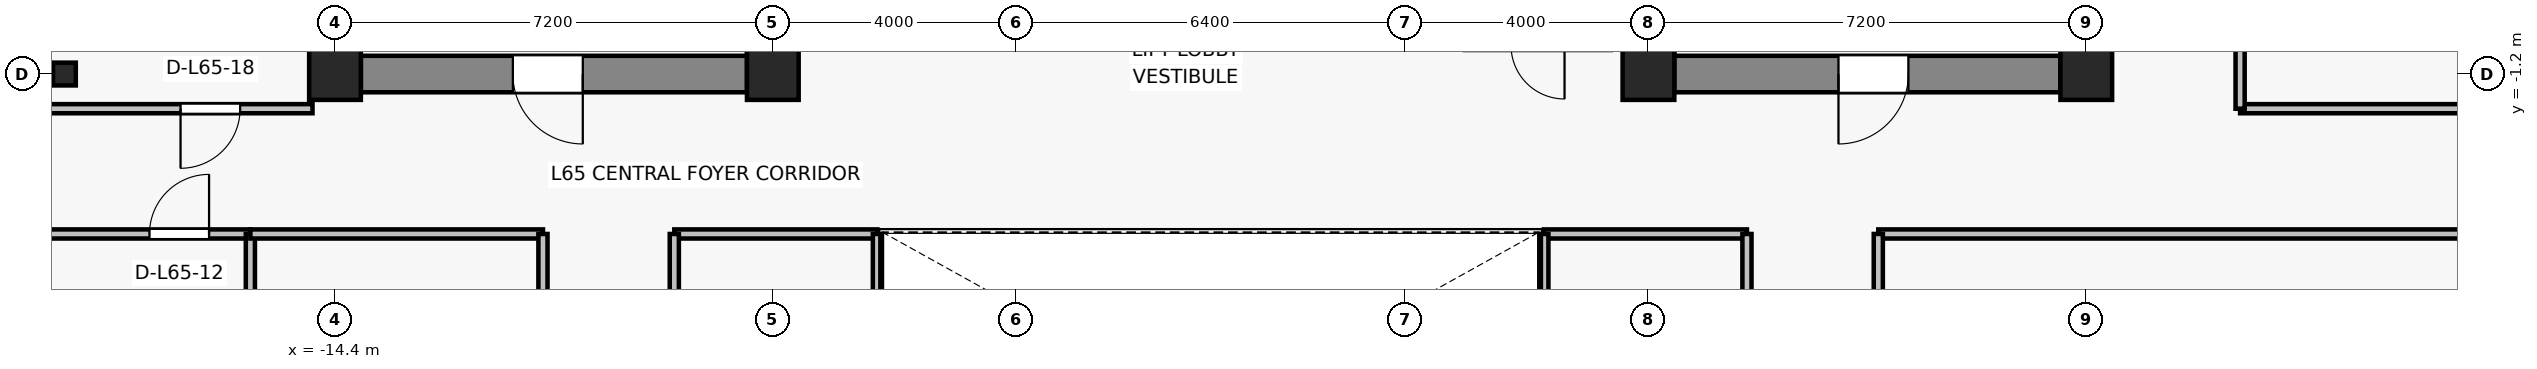
"""IFC4 building model, lengths in metres.
Left out: names, types, materials, properties, quantities, classifications, styles, units other than length and angle.
Written with IfcOpenShell. Run it as: python <this file> out.ifc"""

import sys

from ifc_helpers import new_model, si_unit, direction, frame, frame_2d, origin, origin_2d, place, context, subcontext, project, spatial, rectangle, i_section, extrude, source, transform, mapped, element, fill, save


model = new_model("IFC4")
c1 = context("Model", 3, precision=1e-05, world=origin(), true_north=direction((0.0, 1.0)))
c2 = subcontext(c1, "Body", "Model", "MODEL_VIEW")
j1 = project(units=[si_unit("LENGTHUNIT", "METRE"), si_unit("PLANEANGLEUNIT", "RADIAN")], contexts=[c1])
p1 = place(None, origin())
s1 = spatial("IfcSite", under=j1, at=p1, CompositionType="ELEMENT")
p2 = place(p1, origin())
s2 = spatial("IfcBuilding", under=s1, at=p2, CompositionType="ELEMENT")
p3 = place(p2, frame((0.0, 0.0, 232.0)))
s3 = spatial("IfcBuildingStorey", under=s2, at=p3, CompositionType="ELEMENT", Elevation=232.0)
for number, where, z_axis, x_axis in (
    (1, (-14.4, -1.2, 0.0), (0.0, 0.0, 1.0), (1.0, 0.0, 0.0)),
    (2, (-7.2, -1.2, 0.0), (0.0, 0.0, 1.0), (1.0, 0.0, 0.0)),
    (3, (7.2, -1.2, 0.0), (0.0, 0.0, 1.0), (1.0, 0.0, 0.0)),
    (4, (14.4, -1.2, 0.0), (0.0, 0.0, 1.0), (1.0, 0.0, 0.0)),
):
    element("IfcColumn", number, at=place(p3, frame(where, z_axis=z_axis, x_axis=x_axis)), inside=s3, PredefinedType="COLUMN", context=c2, shape_type="SweptSolid", body=[
        extrude(rectangle(XDim=0.85, YDim=0.85, at=origin_2d()), origin(), (0.0, 0.0, 1.0), 3.3),
    ])
p4 = place(p3, frame((-18.85, -1.2, 0.0), z_axis=(0.0, 0.0, 1.0), x_axis=(1.0, 0.0, 0.0)))
e5 = element("IfcColumn", 5, at=p4, inside=s3, PredefinedType="COLUMN", context=c2, shape_type="SweptSolid", body=[
    extrude(i_section(OverallWidth=0.375, OverallDepth=0.375, WebThickness=0.017, FlangeThickness=0.027, FilletRadius=0.015, at=origin_2d()), origin(), (0.0, 0.0, 1.0), 3.3),
])
p5 = place(p3, frame((-7.625, -1.2, 0.0), z_axis=(0.0, 0.0, 1.0), x_axis=(-1.0, 0.0, 0.0)))
e6 = element("IfcWall", 6, at=p5, inside=s3, PredefinedType="SHEAR", context=c2, shape_type="SweptSolid", body=[
    extrude(rectangle(XDim=6.35, YDim=0.6, at=frame_2d((3.175, 0.0))), origin(), (0.0, 0.0, 1.0), 3.075),
])
p6 = place(p5, frame((2.7, 0.0, 0.0)))
e7 = element("IfcOpeningElement", 7, at=p6, cuts=e6, PredefinedType="OPENING", context=c2, shape_type="SweptSolid", body=[
    extrude(rectangle(XDim=1.15, YDim=2.15, at=frame_2d((0.575, 1.075))), frame((0.0, 0.31, 0.0), z_axis=(0.0, -1.0, 0.0), x_axis=(1.0, 0.0, 0.0)), (0.0, 0.0, 1.0), 0.62),
])
p7 = place(p3, frame((13.975, -1.2, 0.0), z_axis=(0.0, 0.0, 1.0), x_axis=(-1.0, 0.0, 0.0)))
e8 = element("IfcWall", 8, at=p7, inside=s3, PredefinedType="SHEAR", context=c2, shape_type="SweptSolid", body=[
    extrude(rectangle(XDim=6.35, YDim=0.6, at=frame_2d((3.175, 0.0))), origin(), (0.0, 0.0, 1.0), 3.075),
])
p8 = place(p7, frame((2.5, 0.0, 0.0)))
e9 = element("IfcOpeningElement", 9, at=p8, cuts=e8, PredefinedType="OPENING", context=c2, shape_type="SweptSolid", body=[
    extrude(rectangle(XDim=1.15, YDim=2.15, at=frame_2d((0.575, 1.075))), frame((0.0, 0.31, 0.0), z_axis=(0.0, -1.0, 0.0), x_axis=(1.0, 0.0, 0.0)), (0.0, 0.0, 1.0), 0.62),
])
for number, where, z_axis, x_axis in (
    (10, (-7.4, -0.9, 0.0), (0.0, 0.0, 1.0), (0.0, 1.0, 0.0)),
    (11, (7.4, -0.9, 0.0), (0.0, 0.0, 1.0), (0.0, 1.0, 0.0)),
):
    element("IfcWall", number, at=place(p3, frame(where, z_axis=z_axis, x_axis=x_axis)), inside=s3, PredefinedType="SHEAR", context=c2, shape_type="SweptSolid", body=[
        extrude(rectangle(XDim=4.15, YDim=0.45, at=frame_2d((2.075, 0.0))), origin(), (0.0, 0.0, 1.0), 3.075),
    ])
p9 = place(p3, frame((-19.53, -3.83, 0.0), z_axis=(0.0, 0.0, 1.0), x_axis=(1.0, 0.0, 0.0)))
e12 = element("IfcWall", 12, at=p9, inside=s3, PredefinedType="PARTITIONING", context=c2, shape_type="SweptSolid", body=[
    extrude(rectangle(XDim=3.738, YDim=0.15, at=frame_2d((1.869, 0.0))), origin(), (0.0, 0.0, 1.0), 2.765),
])
p10 = place(p9, frame((2.079, 0.0, 0.0)))
e13 = element("IfcOpeningElement", 13, at=p10, cuts=e12, PredefinedType="OPENING", context=c2, shape_type="SweptSolid", body=[
    extrude(rectangle(XDim=0.98, YDim=2.15, at=frame_2d((0.49, 1.075))), frame((0.0, 0.085, 0.0), z_axis=(0.0, -1.0, 0.0), x_axis=(1.0, 0.0, 0.0)), (0.0, 0.0, 1.0), 0.17),
])
p11 = place(p3, frame((-15.792, -3.83, 0.0), z_axis=(0.0, 0.0, 1.0), x_axis=(0.0, -1.0, 0.0)))
e14 = element("IfcWall", 14, at=p11, inside=s3, PredefinedType="PARTITIONING", context=c2, shape_type="SweptSolid", body=[
    extrude(rectangle(XDim=13.2, YDim=0.15, at=frame_2d((6.6, 0.0))), origin(), (0.0, 0.0, 1.0), 2.615),
])
p12 = place(p3, frame((-15.792, -3.83, 0.0), z_axis=(0.0, 0.0, 1.0), x_axis=(1.0, 0.0, 0.0)))
e15 = element("IfcWall", 15, at=p12, inside=s3, PredefinedType="PARTITIONING", context=c2, shape_type="SweptSolid", body=[
    extrude(rectangle(XDim=4.812, YDim=0.15, at=frame_2d((2.406, 0.0))), origin(), (0.0, 0.0, 1.0), 2.615),
])
p13 = place(p3, frame((-10.98, -3.83, 0.0), z_axis=(0.0, 0.0, 1.0), x_axis=(0.0, -1.0, 0.0)))
e16 = element("IfcWall", 16, at=p13, inside=s3, PredefinedType="PARTITIONING", context=c2, shape_type="SweptSolid", body=[
    extrude(rectangle(XDim=13.2, YDim=0.15, at=frame_2d((6.6, 0.0))), origin(), (0.0, 0.0, 1.0), 2.615),
])
p14 = place(p13, frame((2.88, 0.0, 0.0)))
e17 = element("IfcOpeningElement", 17, at=p14, cuts=e16, PredefinedType="OPENING", context=c2, shape_type="SweptSolid", body=[
    extrude(rectangle(XDim=0.98, YDim=2.15, at=frame_2d((0.49, 1.075))), frame((0.0, 0.085, 0.0), z_axis=(0.0, -1.0, 0.0), x_axis=(1.0, 0.0, 0.0)), (0.0, 0.0, 1.0), 0.17),
])
p15 = place(p3, frame((10.98, -3.83, 0.0), z_axis=(0.0, 0.0, 1.0), x_axis=(1.0, 0.0, 0.0)))
e18 = element("IfcWall", 18, at=p15, inside=s3, PredefinedType="PARTITIONING", context=c2, shape_type="SweptSolid", body=[
    extrude(rectangle(XDim=12.55, YDim=0.15, at=frame_2d((6.275, 0.0))), origin(), (0.0, 0.0, 1.0), 2.615),
])
p16 = place(p3, frame((10.98, -17.03, 0.0), z_axis=(0.0, 0.0, 1.0), x_axis=(0.0, 1.0, 0.0)))
e19 = element("IfcWall", 19, at=p16, inside=s3, PredefinedType="PARTITIONING", context=c2, shape_type="SweptSolid", body=[
    extrude(rectangle(XDim=13.2, YDim=0.15, at=frame_2d((6.6, 0.0))), origin(), (0.0, 0.0, 1.0), 2.615),
])
p17 = place(p16, frame((9.34, 0.0, 0.0)))
e20 = element("IfcOpeningElement", 20, at=p17, cuts=e19, PredefinedType="OPENING", context=c2, shape_type="SweptSolid", body=[
    extrude(rectangle(XDim=0.98, YDim=2.15, at=frame_2d((0.49, 1.075))), frame((0.0, 0.085, 0.0), z_axis=(0.0, -1.0, 0.0), x_axis=(1.0, 0.0, 0.0)), (0.0, 0.0, 1.0), 0.17),
])
p18 = place(p3, frame((-8.82, -3.83, 0.0), z_axis=(0.0, 0.0, 1.0), x_axis=(1.0, 0.0, 0.0)))
e21 = element("IfcWall", 21, at=p18, inside=s3, PredefinedType="PARTITIONING", context=c2, shape_type="SweptSolid", body=[
    extrude(rectangle(XDim=3.34, YDim=0.15, at=frame_2d((1.67, 0.0))), origin(), (0.0, 0.0, 1.0), 2.615),
])
p19 = place(p3, frame((-8.82, -17.03, 0.0), z_axis=(0.0, 0.0, 1.0), x_axis=(0.0, 1.0, 0.0)))
e22 = element("IfcWall", 22, at=p19, inside=s3, PredefinedType="PARTITIONING", context=c2, shape_type="SweptSolid", body=[
    extrude(rectangle(XDim=13.2, YDim=0.15, at=frame_2d((6.6, 0.0))), origin(), (0.0, 0.0, 1.0), 2.615),
])
p20 = place(p19, frame((9.385, 0.0, 0.0)))
e23 = element("IfcOpeningElement", 23, at=p20, cuts=e22, PredefinedType="OPENING", context=c2, shape_type="SweptSolid", body=[
    extrude(rectangle(XDim=0.98, YDim=2.15, at=frame_2d((0.49, 1.075))), frame((0.0, 0.085, 0.0), z_axis=(0.0, -1.0, 0.0), x_axis=(1.0, 0.0, 0.0)), (0.0, 0.0, 1.0), 0.17),
])
p21 = place(p3, frame((-5.48, -3.83, 0.0), z_axis=(0.0, 0.0, 1.0), x_axis=(0.0, -1.0, 0.0)))
e24 = element("IfcWall", 24, at=p21, inside=s3, PredefinedType="PARTITIONING", context=c2, shape_type="SweptSolid", body=[
    extrude(rectangle(XDim=13.2, YDim=0.15, at=frame_2d((6.6, 0.0))), origin(), (0.0, 0.0, 1.0), 2.615),
])
p22 = place(p21, frame((7.22, 0.0, 0.0)))
e25 = element("IfcOpeningElement", 25, at=p22, cuts=e24, PredefinedType="OPENING", context=c2, shape_type="SweptSolid", body=[
    extrude(rectangle(XDim=0.98, YDim=2.15, at=frame_2d((0.49, 1.075))), frame((0.0, 0.085, 0.0), z_axis=(0.0, -1.0, 0.0), x_axis=(1.0, 0.0, 0.0)), (0.0, 0.0, 1.0), 0.17),
])
p23 = place(p3, frame((5.48, -3.83, 0.0), z_axis=(0.0, 0.0, 1.0), x_axis=(1.0, 0.0, 0.0)))
e26 = element("IfcWall", 26, at=p23, inside=s3, PredefinedType="PARTITIONING", context=c2, shape_type="SweptSolid", body=[
    extrude(rectangle(XDim=3.34, YDim=0.15, at=frame_2d((1.67, 0.0))), origin(), (0.0, 0.0, 1.0), 2.615),
])
p24 = place(p3, frame((5.48, -17.03, 0.0), z_axis=(0.0, 0.0, 1.0), x_axis=(0.0, 1.0, 0.0)))
e27 = element("IfcWall", 27, at=p24, inside=s3, PredefinedType="PARTITIONING", context=c2, shape_type="SweptSolid", body=[
    extrude(rectangle(XDim=13.2, YDim=0.15, at=frame_2d((6.6, 0.0))), origin(), (0.0, 0.0, 1.0), 2.615),
])
p25 = place(p3, frame((8.82, -3.83, 0.0), z_axis=(0.0, 0.0, 1.0), x_axis=(0.0, -1.0, 0.0)))
e28 = element("IfcWall", 28, at=p25, inside=s3, PredefinedType="PARTITIONING", context=c2, shape_type="SweptSolid", body=[
    extrude(rectangle(XDim=13.2, YDim=0.15, at=frame_2d((6.6, 0.0))), origin(), (0.0, 0.0, 1.0), 2.615),
])
p26 = place(p25, frame((2.835, 0.0, 0.0)))
e29 = element("IfcOpeningElement", 29, at=p26, cuts=e28, PredefinedType="OPENING", context=c2, shape_type="SweptSolid", body=[
    extrude(rectangle(XDim=0.98, YDim=2.15, at=frame_2d((0.49, 1.075))), frame((0.0, 0.085, 0.0), z_axis=(0.0, -1.0, 0.0), x_axis=(1.0, 0.0, 0.0)), (0.0, 0.0, 1.0), 0.17),
])
p27 = place(p3, frame((-14.77, -1.77, 0.0), z_axis=(0.0, 0.0, 1.0), x_axis=(-1.0, 0.0, 0.0)))
e30 = element("IfcWall", 30, at=p27, inside=s3, PredefinedType="PARTITIONING", context=c2, shape_type="SweptSolid", body=[
    extrude(rectangle(XDim=4.76, YDim=0.15, at=frame_2d((2.38, 0.0))), origin(), (0.0, 0.0, 1.0), 2.765),
])
p28 = place(p27, frame((1.19, 0.0, 0.0)))
e31 = element("IfcOpeningElement", 31, at=p28, cuts=e30, PredefinedType="OPENING", context=c2, shape_type="SweptSolid", body=[
    extrude(rectangle(XDim=0.98, YDim=2.15, at=frame_2d((0.49, 1.075))), frame((0.0, 0.085, 0.0), z_axis=(0.0, -1.0, 0.0), x_axis=(1.0, 0.0, 0.0)), (0.0, 0.0, 1.0), 0.17),
])
p29 = place(p3, frame((23.53, -1.77, 0.0), z_axis=(0.0, 0.0, 1.0), x_axis=(-1.0, 0.0, 0.0)))
e32 = element("IfcWall", 32, at=p29, inside=s3, PredefinedType="PARTITIONING", context=c2, shape_type="SweptSolid", body=[
    extrude(rectangle(XDim=6.6, YDim=0.15, at=frame_2d((3.3, 0.0))), origin(), (0.0, 0.0, 1.0), 2.765),
])
p30 = place(p3, frame((16.93, -1.77, 0.0), z_axis=(0.0, 0.0, 1.0), x_axis=(0.0, 1.0, 0.0)))
e33 = element("IfcWall", 33, at=p30, inside=s3, PredefinedType="PARTITIONING", context=c2, shape_type="SweptSolid", body=[
    extrude(rectangle(XDim=15.65, YDim=0.15, at=frame_2d((7.825, 0.0))), origin(), (0.0, 0.0, 1.0), 2.615),
])
p31 = place(p30, frame((7.335, 0.0, 0.0)))
e34 = element("IfcOpeningElement", 34, at=p31, cuts=e33, PredefinedType="OPENING", context=c2, shape_type="SweptSolid", body=[
    extrude(rectangle(XDim=0.98, YDim=2.15, at=frame_2d((0.49, 1.075))), frame((0.0, 0.085, 0.0), z_axis=(0.0, -1.0, 0.0), x_axis=(1.0, 0.0, 0.0)), (0.0, 0.0, 1.0), 0.17),
])
m1 = source(origin(), c2, "Body", "SweptSolid", [
    extrude(rectangle(XDim=1.15, YDim=2.15, at=frame_2d((0.575, 1.075))), frame((0.0, 0.025, 0.0), z_axis=(0.0, -1.0, 0.0), x_axis=(1.0, 0.0, 0.0)), (0.0, 0.0, 1.0), 0.05),
])
p32 = place(p6, origin())
e35 = element("IfcDoor", 35, at=p32, inside=s3, OperationType="SINGLE_SWING_LEFT", PredefinedType="DOOR", context=c2, shape_type="MappedRepresentation", body=[
    mapped(m1, transform((0.0, 0.0, 0.0), x_axis=(1.0, 0.0, 0.0), y_axis=(0.0, 1.0, 0.0), z_axis=(0.0, 0.0, 1.0), scale=1.0)),
])
fill(e7, e35)
p33 = place(p8, origin())
e36 = element("IfcDoor", 36, at=p33, inside=s3, OperationType="SINGLE_SWING_RIGHT", PredefinedType="DOOR", context=c2, shape_type="MappedRepresentation", body=[
    mapped(m1, transform((0.0, 0.0, 0.0), x_axis=(1.0, 0.0, 0.0), y_axis=(0.0, 1.0, 0.0), z_axis=(0.0, 0.0, 1.0), scale=1.0)),
])
fill(e9, e36)
m2 = source(origin(), c2, "Body", "SweptSolid", [
    extrude(rectangle(XDim=0.98, YDim=2.15, at=frame_2d((0.49, 1.075))), frame((0.0, 0.025, 0.0), z_axis=(0.0, -1.0, 0.0), x_axis=(1.0, 0.0, 0.0)), (0.0, 0.0, 1.0), 0.05),
])
p34 = place(p10, origin())
e37 = element("IfcDoor", 37, at=p34, inside=s3, OperationType="SINGLE_SWING_RIGHT", PredefinedType="DOOR", context=c2, shape_type="MappedRepresentation", body=[
    mapped(m2, transform((0.0, 0.0, 0.0), x_axis=(1.0, 0.0, 0.0), y_axis=(0.0, 1.0, 0.0), z_axis=(0.0, 0.0, 1.0), scale=1.0)),
])
fill(e13, e37)
p35 = place(p28, origin())
e38 = element("IfcDoor", 38, at=p35, inside=s3, OperationType="SINGLE_SWING_RIGHT", PredefinedType="DOOR", context=c2, shape_type="MappedRepresentation", body=[
    mapped(m2, transform((0.0, 0.0, 0.0), x_axis=(1.0, 0.0, 0.0), y_axis=(0.0, 1.0, 0.0), z_axis=(0.0, 0.0, 1.0), scale=1.0)),
])
fill(e31, e38)
save(model, sys.argv[1])
